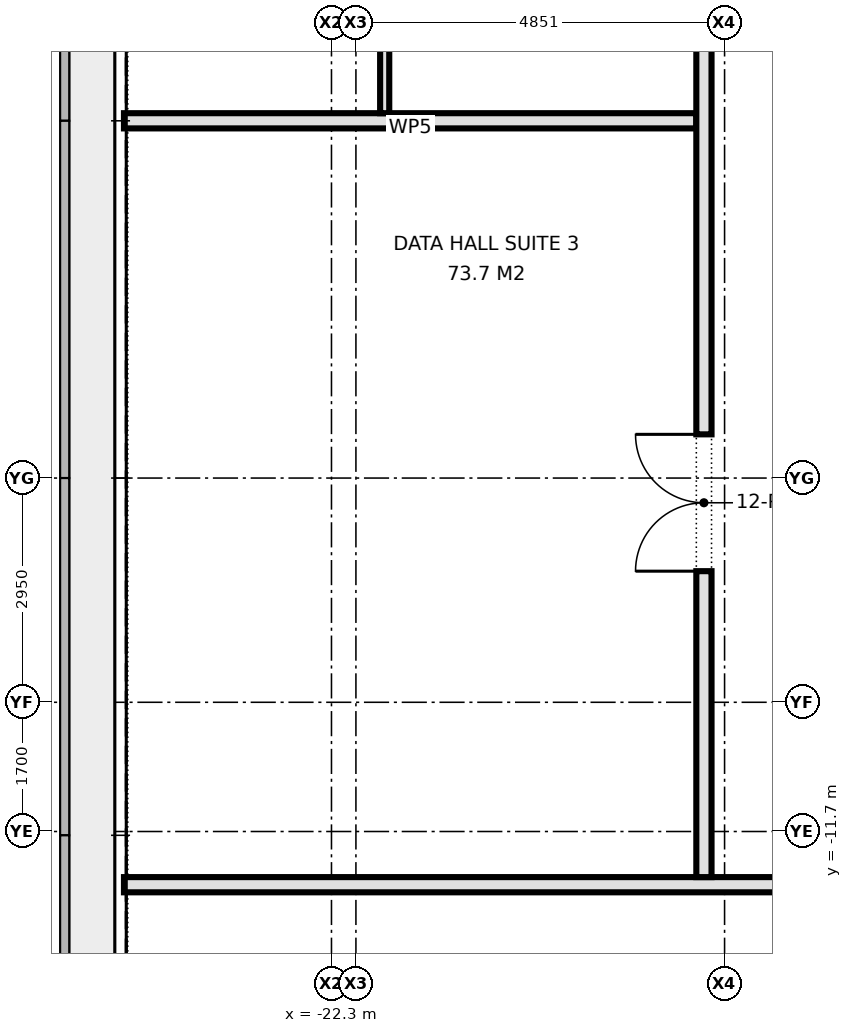
"""IFC4 building model, lengths in metres.
Left out: names, types, materials, properties, quantities, classifications, styles, units other than length and angle.
Written with IfcOpenShell. Run it as: python <this file> out.ifc"""

import sys

from ifc_helpers import new_model, si_unit, direction, frame, frame_2d, origin, place, context, subcontext, project, spatial, rectangle, extrude, element, fill, save


model = new_model("IFC4")
c1 = context("Model", 3, precision=1e-05, world=origin(), true_north=direction((0.0, 1.0)))
c2 = subcontext(c1, "Body", "Model", "MODEL_VIEW")
j1 = project(units=[si_unit("LENGTHUNIT", "METRE"), si_unit("PLANEANGLEUNIT", "RADIAN")], contexts=[c1])
p1 = place(None, origin())
s1 = spatial("IfcSite", under=j1, at=p1, CompositionType="ELEMENT")
p2 = place(p1, origin())
s2 = spatial("IfcBuilding", under=s1, at=p2, CompositionType="ELEMENT")
p3 = place(p2, frame((0.0, 0.0, 54.5)))
s3 = spatial("IfcBuildingStorey", under=s2, at=p3, CompositionType="ELEMENT", Elevation=54.5)
p4 = place(p3, frame((-25.03, -12.4, 0.0), z_axis=(0.0, 0.0, 1.0), x_axis=(1.0, 0.0, 0.0)))
e1 = element("IfcWall", 1, at=p4, inside=s3, PredefinedType="PARTITIONING", context=c2, shape_type="SweptSolid", body=[
    extrude(rectangle(XDim=50.06, YDim=0.2, at=frame_2d((25.03, 0.0))), origin(), (0.0, 0.0, 1.0), 4.575),
])
p5 = place(p4, frame((18.95, 0.0, 0.0)))
e2 = element("IfcOpeningElement", 2, at=p5, cuts=e1, PredefinedType="OPENING", context=c2, shape_type="SweptSolid", body=[
    extrude(rectangle(XDim=1.8, YDim=2.1, at=frame_2d((0.9, 1.05))), frame((0.0, 0.11, 0.0), z_axis=(0.0, -1.0, 0.0), x_axis=(1.0, 0.0, 0.0)), (0.0, 0.0, 1.0), 0.22),
])
p6 = place(p4, frame((37.86, 0.0, 0.0)))
e3 = element("IfcOpeningElement", 3, at=p6, cuts=e1, PredefinedType="OPENING", context=c2, shape_type="SweptSolid", body=[
    extrude(rectangle(XDim=1.8, YDim=2.1, at=frame_2d((0.9, 1.05))), frame((0.0, 0.11, 0.0), z_axis=(0.0, -1.0, 0.0), x_axis=(1.0, 0.0, 0.0)), (0.0, 0.0, 1.0), 0.22),
])
p7 = place(p4, frame((32.98, 0.0, 0.0)))
e4 = element("IfcOpeningElement", 4, at=p7, cuts=e1, PredefinedType="OPENING", context=c2, shape_type="SweptSolid", body=[
    extrude(rectangle(XDim=1.2, YDim=2.1, at=frame_2d((0.6, 1.05))), frame((0.0, 0.11, 0.0), z_axis=(0.0, -1.0, 0.0), x_axis=(1.0, 0.0, 0.0)), (0.0, 0.0, 1.0), 0.22),
])
p8 = place(p3, frame((-25.03, -2.35, 0.0), z_axis=(0.0, 0.0, 1.0), x_axis=(1.0, 0.0, 0.0)))
e5 = element("IfcWall", 5, at=p8, inside=s3, PredefinedType="PARTITIONING", context=c2, shape_type="SweptSolid", body=[
    extrude(rectangle(XDim=7.53, YDim=0.2, at=frame_2d((3.765, 0.0))), origin(), (0.0, 0.0, 1.0), 4.575),
])
p9 = place(p3, frame((-17.4, -12.3, 0.0), z_axis=(0.0, 0.0, 1.0), x_axis=(0.0, 1.0, 0.0)))
e6 = element("IfcWall", 6, at=p9, inside=s3, PredefinedType="PARTITIONING", context=c2, shape_type="SweptSolid", body=[
    extrude(rectangle(XDim=28.2, YDim=0.2, at=frame_2d((14.1, 0.0))), origin(), (0.0, 0.0, 1.0), 4.575),
])
p10 = place(p9, frame((4.025, 0.0, 0.0)))
e7 = element("IfcOpeningElement", 7, at=p10, cuts=e6, PredefinedType="OPENING", context=c2, shape_type="SweptSolid", body=[
    extrude(rectangle(XDim=1.8, YDim=2.1, at=frame_2d((0.9, 1.05))), frame((0.0, 0.11, 0.0), z_axis=(0.0, -1.0, 0.0), x_axis=(1.0, 0.0, 0.0)), (0.0, 0.0, 1.0), 0.22),
])
p11 = place(p9, frame((20.525, 0.0, 0.0)))
e8 = element("IfcOpeningElement", 8, at=p11, cuts=e6, PredefinedType="OPENING", context=c2, shape_type="SweptSolid", body=[
    extrude(rectangle(XDim=1.8, YDim=2.1, at=frame_2d((0.9, 1.05))), frame((0.0, 0.11, 0.0), z_axis=(0.0, -1.0, 0.0), x_axis=(1.0, 0.0, 0.0)), (0.0, 0.0, 1.0), 0.22),
])
p12 = place(p9, frame((10.95, 0.0, 0.0)))
e9 = element("IfcOpeningElement", 9, at=p12, cuts=e6, PredefinedType="OPENING", context=c2, shape_type="SweptSolid", body=[
    extrude(rectangle(XDim=1.0, YDim=2.1, at=frame_2d((0.5, 1.05))), frame((0.0, 0.11, 0.0), z_axis=(0.0, -1.0, 0.0), x_axis=(1.0, 0.0, 0.0)), (0.0, 0.0, 1.0), 0.22),
])
p13 = place(p9, frame((13.95, 0.0, 0.0)))
e10 = element("IfcOpeningElement", 10, at=p13, cuts=e6, PredefinedType="OPENING", context=c2, shape_type="SweptSolid", body=[
    extrude(rectangle(XDim=1.0, YDim=2.1, at=frame_2d((0.5, 1.05))), frame((0.0, 0.11, 0.0), z_axis=(0.0, -1.0, 0.0), x_axis=(1.0, 0.0, 0.0)), (0.0, 0.0, 1.0), 0.22),
])
p14 = place(p9, frame((16.55, 0.0, 0.0)))
e11 = element("IfcOpeningElement", 11, at=p14, cuts=e6, PredefinedType="OPENING", context=c2, shape_type="SweptSolid", body=[
    extrude(rectangle(XDim=1.0, YDim=2.1, at=frame_2d((0.5, 1.05))), frame((0.0, 0.11, 0.0), z_axis=(0.0, -1.0, 0.0), x_axis=(1.0, 0.0, 0.0)), (0.0, 0.0, 1.0), 0.22),
])
p15 = place(p3, frame((-21.6, -2.25, 0.0), z_axis=(0.0, 0.0, 1.0), x_axis=(0.0, 1.0, 0.0)))
e12 = element("IfcWall", 12, at=p15, inside=s3, PredefinedType="PARTITIONING", context=c2, shape_type="SweptSolid", body=[
    extrude(rectangle(XDim=8.04, YDim=0.12, at=frame_2d((4.02, 0.0))), origin(), (0.0, 0.0, 1.0), 4.575),
])
p16 = place(p10, origin())
e13 = element("IfcDoor", 13, at=p16, inside=s3, OperationType="DOUBLE_DOOR_SINGLE_SWING", PredefinedType="DOOR", context=c2, shape_type="SweptSolid", body=[
    extrude(rectangle(XDim=1.8, YDim=2.1, at=frame_2d((0.9, 1.05))), frame((0.0, 0.025, 0.0), z_axis=(0.0, -1.0, 0.0), x_axis=(1.0, 0.0, 0.0)), (0.0, 0.0, 1.0), 0.05),
])
fill(e7, e13)
save(model, sys.argv[1])
